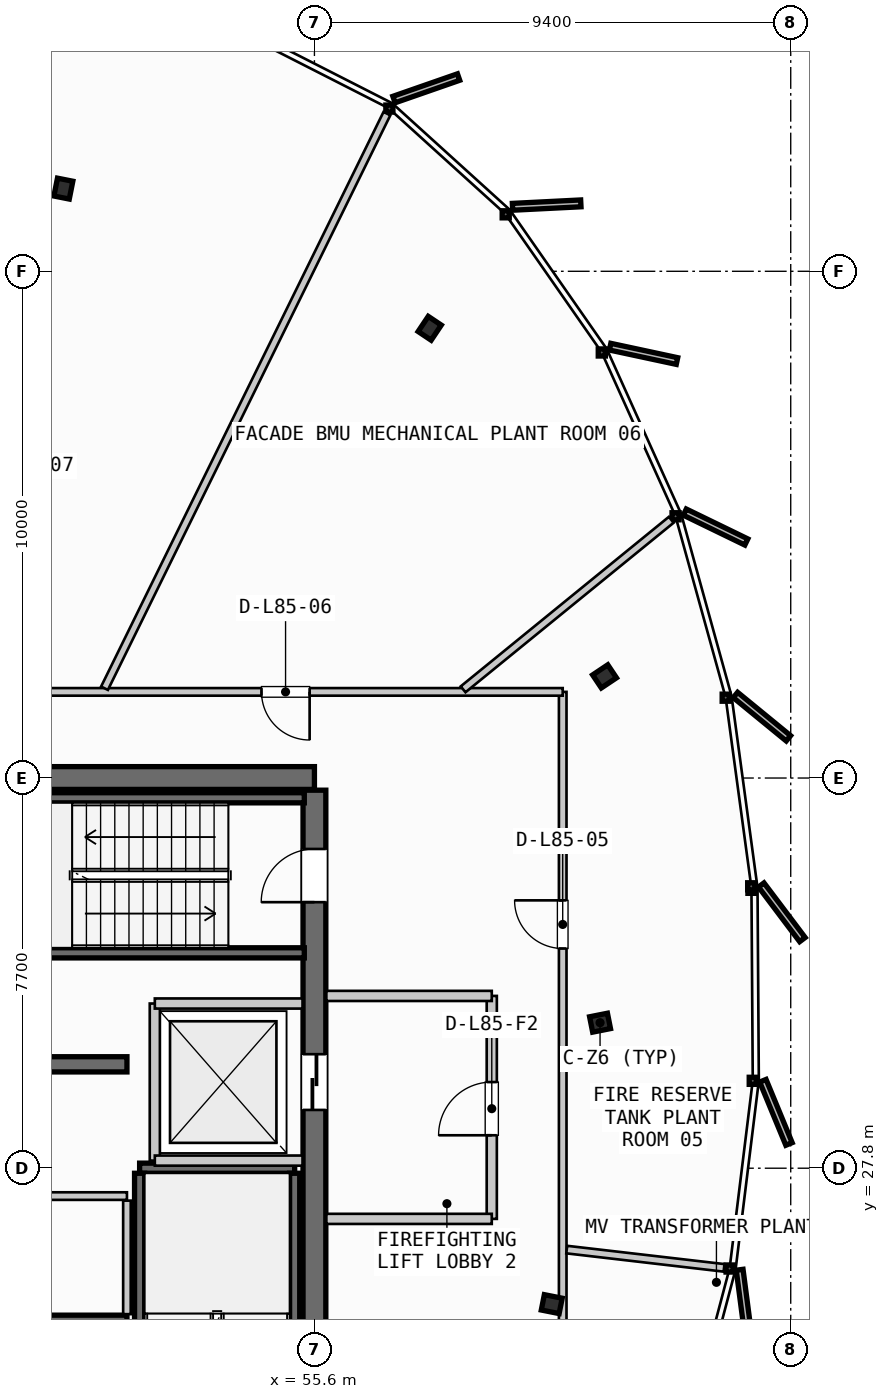
"""IFC4 building model, lengths in metres.
Left out: names, types, materials, properties, quantities, classifications, styles, units other than length and angle.
Written with IfcOpenShell. Run it as: python <this file> out.ifc"""

import sys

from ifc_helpers import new_model, si_unit, direction, frame, frame_2d, origin, origin_2d, place, context, subcontext, project, spatial, rectangle, i_section, extrude, source, transform, mapped, element, fill, save


model = new_model("IFC4")
c1 = context("Model", 3, precision=1e-05, world=origin(), true_north=direction((0.0, 1.0)))
c2 = subcontext(c1, "Body", "Model", "MODEL_VIEW")
j1 = project(units=[si_unit("LENGTHUNIT", "METRE"), si_unit("PLANEANGLEUNIT", "RADIAN")], contexts=[c1])
p1 = place(None, origin())
s1 = spatial("IfcSite", under=j1, at=p1, CompositionType="ELEMENT")
p2 = place(p1, origin())
s2 = spatial("IfcBuilding", under=s1, at=p2, CompositionType="ELEMENT")
p3 = place(p2, frame((0.0, 0.0, 320.3)))
s3 = spatial("IfcBuildingStorey", under=s2, at=p3, CompositionType="ELEMENT", Elevation=320.3)
p4 = place(p3, frame((55.6, 35.5, 0.0), z_axis=(0.0, 0.0, 1.0), x_axis=(-1.0, 0.0, 0.0)))
e1 = element("IfcWall", 1, at=p4, inside=s3, PredefinedType="SHEAR", context=c2, shape_type="SweptSolid", body=[
    extrude(rectangle(XDim=17.6, YDim=0.45, at=frame_2d((8.8, 0.0))), origin(), (0.0, 0.0, 1.0), 3.735),
])
p5 = place(p4, frame((8.05, 0.0, 0.0)))
e2 = element("IfcOpeningElement", 2, at=p5, cuts=e1, PredefinedType="OPENING", context=c2, shape_type="SweptSolid", body=[
    extrude(rectangle(XDim=1.5, YDim=2.2, at=frame_2d((0.75, 1.1))), frame((0.0, 0.235, 0.0), z_axis=(0.0, -1.0, 0.0), x_axis=(1.0, 0.0, 0.0)), (0.0, 0.0, 1.0), 0.47),
])
p6 = place(p4, frame((15.85, 0.0, 0.0)))
e3 = element("IfcOpeningElement", 3, at=p6, cuts=e1, PredefinedType="OPENING", context=c2, shape_type="SweptSolid", body=[
    extrude(rectangle(XDim=0.85, YDim=2.15, at=frame_2d((0.425, 1.075))), frame((0.0, 0.235, 0.0), z_axis=(0.0, -1.0, 0.0), x_axis=(1.0, 0.0, 0.0)), (0.0, 0.0, 1.0), 0.47),
])
p7 = place(p4, frame((14.35, 0.0, 0.0)))
e4 = element("IfcOpeningElement", 4, at=p7, cuts=e1, PredefinedType="OPENING", context=c2, shape_type="SweptSolid", body=[
    extrude(rectangle(XDim=0.85, YDim=2.15, at=frame_2d((0.425, 1.075))), frame((0.0, 0.235, 0.0), z_axis=(0.0, -1.0, 0.0), x_axis=(1.0, 0.0, 0.0)), (0.0, 0.0, 1.0), 0.47),
])
p8 = place(p4, frame((12.3, 0.0, 0.0)))
e5 = element("IfcOpeningElement", 5, at=p8, cuts=e1, PredefinedType="OPENING", context=c2, shape_type="SweptSolid", body=[
    extrude(rectangle(XDim=0.95, YDim=2.15, at=frame_2d((0.475, 1.075))), frame((0.0, 0.235, 0.0), z_axis=(0.0, -1.0, 0.0), x_axis=(1.0, 0.0, 0.0)), (0.0, 0.0, 1.0), 0.47),
])
p9 = place(p4, frame((10.2, 0.0, 0.0)))
e6 = element("IfcOpeningElement", 6, at=p9, cuts=e1, PredefinedType="OPENING", context=c2, shape_type="SweptSolid", body=[
    extrude(rectangle(XDim=0.9, YDim=2.15, at=frame_2d((0.45, 1.075))), frame((0.0, 0.235, 0.0), z_axis=(0.0, -1.0, 0.0), x_axis=(1.0, 0.0, 0.0)), (0.0, 0.0, 1.0), 0.47),
])
p10 = place(p3, frame((55.6, 20.34, 0.0), z_axis=(0.0, 0.0, 1.0), x_axis=(0.0, 1.0, 0.0)))
e7 = element("IfcWall", 7, at=p10, inside=s3, PredefinedType="SHEAR", context=c2, shape_type="SweptSolid", body=[
    extrude(rectangle(XDim=14.92, YDim=0.45, at=frame_2d((7.46, 0.0))), origin(), (0.0, 0.0, 1.0), 3.735),
])
p11 = place(p10, frame((12.71, 0.0, 0.0)))
e8 = element("IfcOpeningElement", 8, at=p11, cuts=e7, PredefinedType="OPENING", context=c2, shape_type="SweptSolid", body=[
    extrude(rectangle(XDim=1.05, YDim=2.15, at=frame_2d((0.525, 1.075))), frame((0.0, 0.235, 0.0), z_axis=(0.0, -1.0, 0.0), x_axis=(1.0, 0.0, 0.0)), (0.0, 0.0, 1.0), 0.47),
])
p12 = place(p10, frame((8.61, 0.0, 0.0)))
e9 = element("IfcOpeningElement", 9, at=p12, cuts=e7, PredefinedType="OPENING", context=c2, shape_type="SweptSolid", body=[
    extrude(rectangle(XDim=1.1, YDim=2.2, at=frame_2d((0.55, 1.1))), frame((0.0, 0.235, 0.0), z_axis=(0.0, -1.0, 0.0), x_axis=(1.0, 0.0, 0.0)), (0.0, 0.0, 1.0), 0.47),
])
p13 = place(p3, frame((47.65, 24.75, 0.0), z_axis=(0.0, 0.0, 1.0), x_axis=(1.0, 0.0, 0.0)))
e10 = element("IfcWall", 10, at=p13, inside=s3, PredefinedType="SHEAR", context=c2, shape_type="SweptSolid", body=[
    extrude(rectangle(XDim=4.25, YDim=0.3, at=frame_2d((2.125, 0.0))), origin(), (0.0, 0.0, 1.0), 3.735),
])
p14 = place(p13, frame((1.55, 0.0, 0.0)))
e11 = element("IfcOpeningElement", 11, at=p14, cuts=e10, PredefinedType="OPENING", context=c2, shape_type="SweptSolid", body=[
    extrude(rectangle(XDim=0.95, YDim=2.15, at=frame_2d((0.475, 1.075))), frame((0.0, 0.16, 0.0), z_axis=(0.0, -1.0, 0.0), x_axis=(1.0, 0.0, 0.0)), (0.0, 0.0, 1.0), 0.32),
])
p15 = place(p3, frame((47.65, 29.85, 0.0), z_axis=(0.0, 0.0, 1.0), x_axis=(1.0, 0.0, 0.0)))
e12 = element("IfcWall", 12, at=p15, inside=s3, PredefinedType="SHEAR", context=c2, shape_type="SweptSolid", body=[
    extrude(rectangle(XDim=4.25, YDim=0.3, at=frame_2d((2.125, 0.0))), origin(), (0.0, 0.0, 1.0), 3.735),
])
m1 = source(origin(), c2, "Body", "SweptSolid", [
    extrude(i_section(OverallWidth=0.309, OverallDepth=0.359, WebThickness=0.016, FlangeThickness=0.026, FilletRadius=0.027, at=origin_2d()), origin(), (0.0, 0.0, 1.0), 3.735),
])
for number, where, z_axis, x_axis in (
    (13, (61.237, 30.672, 0.0), (0.0, 0.0, 1.0), (0.981, 0.195, 0.0)),
    (14, (61.326, 37.506, 0.0), (0.0, 0.0, 1.0), (0.831, 0.556, 0.0)),
    (15, (57.875, 44.375, 0.0), (0.0, 0.0, 1.0), (0.556, 0.831, 0.0)),
    (16, (50.645, 47.132, 0.0), (0.0, 0.0, 1.0), (0.195, 0.981, 0.0)),
    (17, (60.284, 25.118, 0.0), (0.0, 0.0, 1.0), (0.981, -0.195, 0.0)),
):
    element("IfcColumn", number, at=place(p3, frame(where, z_axis=z_axis, x_axis=x_axis)), inside=s3, PredefinedType="COLUMN", context=c2, shape_type="MappedRepresentation", body=[
        mapped(m1, transform((0.0, 0.0, 0.0), scale=1.0)),
    ])
p16 = place(p3, frame((52.15, 27.8, 0.0), z_axis=(0.0, 0.0, 1.0), x_axis=(1.0, 0.0, 0.0)))
e18 = element("IfcWall", 18, at=p16, inside=s3, PredefinedType="SHEAR", context=c2, shape_type="SweptSolid", body=[
    extrude(rectangle(XDim=3.06, YDim=0.2, at=frame_2d((1.53, 0.0))), origin(), (0.0, 0.0, 1.0), 3.735),
])
for number, where, z_axis, x_axis in (
    (19, (55.21, 27.7, 0.0), (0.0, 0.0, 1.0), (0.0, -1.0, 0.0)),
    (20, (52.15, 20.35, 0.0), (0.0, 0.0, 1.0), (0.0, 1.0, 0.0)),
    (21, (48.05, 35.11, 0.0), (0.0, 0.0, 1.0), (1.0, 0.0, 0.0)),
    (22, (55.4, 32.05, 0.0), (0.0, 0.0, 1.0), (-1.0, 0.0, 0.0)),
):
    element("IfcWall", number, at=place(p3, frame(where, z_axis=z_axis, x_axis=x_axis)), inside=s3, PredefinedType="SHEAR", context=c2, shape_type="SweptSolid", body=[
        extrude(rectangle(XDim=7.35, YDim=0.2, at=frame_2d((3.675, 0.0))), origin(), (0.0, 0.0, 1.0), 3.735),
    ])
p17 = place(p3, frame((52.45, 27.95, 0.0), z_axis=(0.0, 0.0, 1.0), x_axis=(0.0, 1.0, 0.0)))
e23 = element("IfcWall", 23, at=p17, inside=s3, PredefinedType="PARTITIONING", context=c2, shape_type="SweptSolid", body=[
    extrude(rectangle(XDim=3.1, YDim=0.2, at=frame_2d((1.55, 0.0))), origin(), (0.0, 0.0, 1.0), 3.26),
])
for number, where, z_axis, x_axis in (
    (24, (52.45, 27.95, 0.0), (0.0, 0.0, 1.0), (1.0, 0.0, 0.0)),
    (25, (52.45, 31.05, 0.0), (0.0, 0.0, 1.0), (1.0, 0.0, 0.0)),
):
    element("IfcWall", number, at=place(p3, frame(where, z_axis=z_axis, x_axis=x_axis)), inside=s3, PredefinedType="PARTITIONING", context=c2, shape_type="SweptSolid", body=[
        extrude(rectangle(XDim=2.915, YDim=0.2, at=frame_2d((1.458, 0.0))), origin(), (0.0, 0.0, 1.0), 3.26),
    ])
p18 = place(p3, frame((59.1, 26.8, 0.0), z_axis=(0.0, 0.0, 1.0), x_axis=(0.0, 1.0, 0.0)))
e26 = element("IfcWall", 26, at=p18, inside=s3, PredefinedType="PARTITIONING", context=c2, shape_type="SweptSolid", body=[
    extrude(rectangle(XDim=4.4, YDim=0.2, at=frame_2d((2.2, 0.0))), origin(), (0.0, 0.0, 1.0), 3.26),
])
p19 = place(p18, frame((1.65, 0.0, 0.0)))
e27 = element("IfcOpeningElement", 27, at=p19, cuts=e26, PredefinedType="OPENING", context=c2, shape_type="SweptSolid", body=[
    extrude(rectangle(XDim=1.05, YDim=2.15, at=frame_2d((0.525, 1.075))), frame((0.0, 0.11, 0.0), z_axis=(0.0, -1.0, 0.0), x_axis=(1.0, 0.0, 0.0)), (0.0, 0.0, 1.0), 0.22),
])
for number, where, z_axis, x_axis in (
    (28, (55.835, 26.8, 0.0), (0.0, 0.0, 1.0), (1.0, 0.0, 0.0)),
    (29, (55.835, 31.2, 0.0), (0.0, 0.0, 1.0), (1.0, 0.0, 0.0)),
):
    element("IfcWall", number, at=place(p3, frame(where, z_axis=z_axis, x_axis=x_axis)), inside=s3, PredefinedType="PARTITIONING", context=c2, shape_type="SweptSolid", body=[
        extrude(rectangle(XDim=3.265, YDim=0.2, at=frame_2d((1.633, 0.0))), origin(), (0.0, 0.0, 1.0), 3.26),
    ])
p20 = place(p3, frame((47.65, 27.25, 0.0), z_axis=(0.0, 0.0, 1.0), x_axis=(1.0, 0.0, 0.0)))
e30 = element("IfcWall", 30, at=p20, inside=s3, PredefinedType="PARTITIONING", context=c2, shape_type="SweptSolid", body=[
    extrude(rectangle(XDim=4.25, YDim=0.15, at=frame_2d((2.125, 0.0))), origin(), (0.0, 0.0, 1.0), 3.26),
])
p21 = place(p3, frame((51.9, 24.92, 0.0), z_axis=(0.0, 0.0, 1.0), x_axis=(0.0, 1.0, 0.0)))
e31 = element("IfcWall", 31, at=p21, inside=s3, PredefinedType="PARTITIONING", context=c2, shape_type="SweptSolid", body=[
    extrude(rectangle(XDim=2.24, YDim=0.15, at=frame_2d((1.12, 0.0))), origin(), (0.0, 0.0, 1.0), 3.26),
])
p22 = place(p3, frame((60.5, 18.4, 0.0), z_axis=(0.0, 0.0, 1.0), x_axis=(0.0, 1.0, 0.0)))
e32 = element("IfcWall", 32, at=p22, inside=s3, PredefinedType="PARTITIONING", context=c2, shape_type="SweptSolid", body=[
    extrude(rectangle(XDim=18.8, YDim=0.15, at=frame_2d((9.4, 0.0))), origin(), (0.0, 0.0, 1.0), 3.26),
])
p23 = place(p22, frame((3.717, 0.0, 0.0)))
e33 = element("IfcOpeningElement", 33, at=p23, cuts=e32, PredefinedType="OPENING", context=c2, shape_type="SweptSolid", body=[
    extrude(rectangle(XDim=0.95, YDim=2.15, at=frame_2d((0.475, 1.075))), frame((0.0, 0.085, 0.0), z_axis=(0.0, -1.0, 0.0), x_axis=(1.0, 0.0, 0.0)), (0.0, 0.0, 1.0), 0.17),
])
p24 = place(p22, frame((13.736, 0.0, 0.0)))
e34 = element("IfcOpeningElement", 34, at=p24, cuts=e32, PredefinedType="OPENING", context=c2, shape_type="SweptSolid", body=[
    extrude(rectangle(XDim=0.95, YDim=2.15, at=frame_2d((0.475, 1.075))), frame((0.0, 0.085, 0.0), z_axis=(0.0, -1.0, 0.0), x_axis=(1.0, 0.0, 0.0)), (0.0, 0.0, 1.0), 0.17),
])
p25 = place(p3, frame((60.5, 37.2, 0.0), z_axis=(0.0, 0.0, 1.0), x_axis=(-1.0, 0.0, 0.0)))
e35 = element("IfcWall", 35, at=p25, inside=s3, PredefinedType="PARTITIONING", context=c2, shape_type="SweptSolid", body=[
    extrude(rectangle(XDim=27.4, YDim=0.15, at=frame_2d((13.7, 0.0))), origin(), (0.0, 0.0, 1.0), 3.26),
])
p26 = place(p25, frame((4.995, 0.0, 0.0)))
e36 = element("IfcOpeningElement", 36, at=p26, cuts=e35, PredefinedType="OPENING", context=c2, shape_type="SweptSolid", body=[
    extrude(rectangle(XDim=0.95, YDim=2.15, at=frame_2d((0.475, 1.075))), frame((0.0, 0.085, 0.0), z_axis=(0.0, -1.0, 0.0), x_axis=(1.0, 0.0, 0.0)), (0.0, 0.0, 1.0), 0.17),
])
p27 = place(p25, frame((12.956, 0.0, 0.0)))
e37 = element("IfcOpeningElement", 37, at=p27, cuts=e35, PredefinedType="OPENING", context=c2, shape_type="SweptSolid", body=[
    extrude(rectangle(XDim=0.95, YDim=2.15, at=frame_2d((0.475, 1.075))), frame((0.0, 0.085, 0.0), z_axis=(0.0, -1.0, 0.0), x_axis=(1.0, 0.0, 0.0)), (0.0, 0.0, 1.0), 0.17),
])
p28 = place(p25, frame((20.303, 0.0, 0.0)))
e38 = element("IfcOpeningElement", 38, at=p28, cuts=e35, PredefinedType="OPENING", context=c2, shape_type="SweptSolid", body=[
    extrude(rectangle(XDim=0.95, YDim=2.15, at=frame_2d((0.475, 1.075))), frame((0.0, 0.085, 0.0), z_axis=(0.0, -1.0, 0.0), x_axis=(1.0, 0.0, 0.0)), (0.0, 0.0, 1.0), 0.17),
])
p29 = place(p3, frame((60.58, 26.194, 0.0), z_axis=(0.0, 0.0, 1.0), x_axis=(0.993303836754, -0.115531328606, 0.0)))
e39 = element("IfcWall", 39, at=p29, inside=s3, PredefinedType="PARTITIONING", context=c2, shape_type="SweptSolid", body=[
    extrude(rectangle(XDim=3.125, YDim=0.15, at=frame_2d((1.563, 0.0))), origin(), (0.0, 0.0, 1.0), 3.26),
])
p30 = place(p3, frame((58.534, 37.25, 0.0), z_axis=(0.0, 0.0, 1.0), x_axis=(0.775394599075, 0.63147701124, 0.0)))
e40 = element("IfcWall", 40, at=p30, inside=s3, PredefinedType="PARTITIONING", context=c2, shape_type="SweptSolid", body=[
    extrude(rectangle(XDim=5.298, YDim=0.15, at=frame_2d((2.649, 0.0))), origin(), (0.0, 0.0, 1.0), 3.26),
])
p31 = place(p3, frame((51.457, 37.272, 0.0), z_axis=(0.0, 0.0, 1.0), x_axis=(0.44109774977, 0.897459066001, 0.0)))
e41 = element("IfcWall", 41, at=p31, inside=s3, PredefinedType="PARTITIONING", context=c2, shape_type="SweptSolid", body=[
    extrude(rectangle(XDim=12.636, YDim=0.15, at=frame_2d((6.318, 0.0))), origin(), (0.0, 0.0, 1.0), 3.26),
])
m2 = source(origin(), c2, "Body", "SweptSolid", [
    extrude(rectangle(XDim=1.05, YDim=2.15, at=frame_2d((0.525, 1.075))), frame((0.0, 0.025, 0.0), z_axis=(0.0, -1.0, 0.0), x_axis=(1.0, 0.0, 0.0)), (0.0, 0.0, 1.0), 0.05),
])
p32 = place(p11, origin())
e42 = element("IfcDoor", 42, at=p32, inside=s3, OperationType="SINGLE_SWING_LEFT", PredefinedType="DOOR", context=c2, shape_type="MappedRepresentation", body=[
    mapped(m2, transform((0.0, 0.0, 0.0), scale=1.0)),
])
fill(e8, e42)
m3 = source(origin(), c2, "Body", "SweptSolid", [
    extrude(rectangle(XDim=1.1, YDim=2.2, at=frame_2d((0.55, 1.1))), frame((0.0, 0.025, 0.0), z_axis=(0.0, -1.0, 0.0), x_axis=(1.0, 0.0, 0.0)), (0.0, 0.0, 1.0), 0.05),
])
p33 = place(p12, origin())
e43 = element("IfcDoor", 43, at=p33, inside=s3, OperationType="SLIDING_TO_RIGHT", PredefinedType="DOOR", context=c2, shape_type="MappedRepresentation", body=[
    mapped(m3, transform((0.0, 0.0, 0.0), scale=1.0)),
])
fill(e9, e43)
p34 = place(p19, origin())
e44 = element("IfcDoor", 44, at=p34, inside=s3, OperationType="SINGLE_SWING_LEFT", PredefinedType="DOOR", context=c2, shape_type="MappedRepresentation", body=[
    mapped(m2, transform((0.0, 0.0, 0.0), scale=1.0)),
])
fill(e27, e44)
m4 = source(origin(), c2, "Body", "SweptSolid", [
    extrude(rectangle(XDim=0.95, YDim=2.15, at=frame_2d((0.475, 1.075))), frame((0.0, 0.025, 0.0), z_axis=(0.0, -1.0, 0.0), x_axis=(1.0, 0.0, 0.0)), (0.0, 0.0, 1.0), 0.05),
])
p35 = place(p24, origin())
e45 = element("IfcDoor", 45, at=p35, inside=s3, OperationType="SINGLE_SWING_RIGHT", PredefinedType="DOOR", context=c2, shape_type="MappedRepresentation", body=[
    mapped(m4, transform((0.0, 0.0, 0.0), scale=1.0)),
])
fill(e34, e45)
p36 = place(p26, origin())
e46 = element("IfcDoor", 46, at=p36, inside=s3, OperationType="SINGLE_SWING_LEFT", PredefinedType="DOOR", context=c2, shape_type="MappedRepresentation", body=[
    mapped(m4, transform((0.0, 0.0, 0.0), scale=1.0)),
])
fill(e36, e46)
save(model, sys.argv[1])
